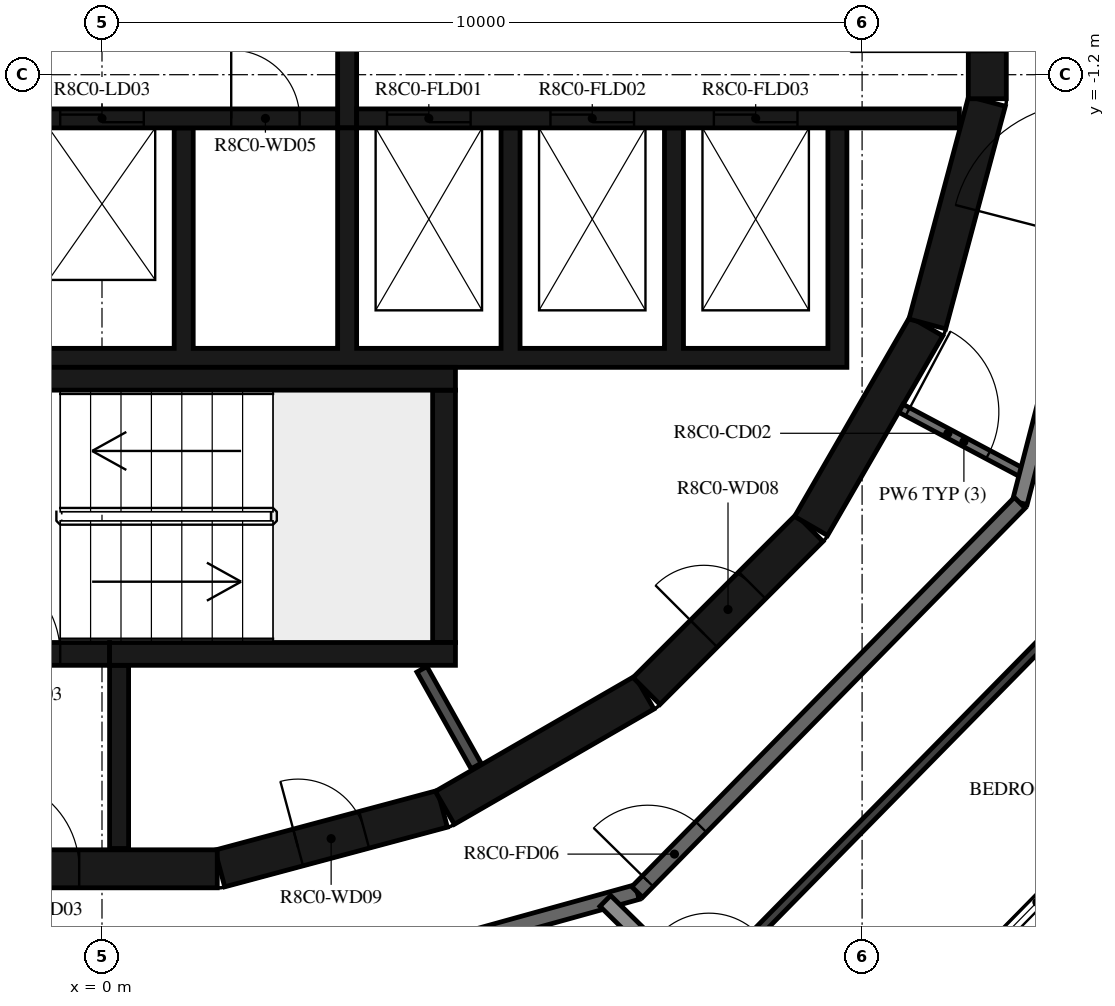
"""IFC4 building model, lengths in metres.
Left out: names, types, materials, properties, quantities, classifications, styles, units other than length and angle.
Written with IfcOpenShell. Run it as: python <this file> out.ifc"""

import sys

from ifc_helpers import new_model, si_unit, direction, frame, frame_2d, origin, place, context, subcontext, project, spatial, polyline, rectangle, outline, extrude, element, fill, save


model = new_model("IFC4")
c1 = context("Model", 3, precision=1e-05, world=origin(), true_north=direction((0.0, 1.0)))
c2 = subcontext(c1, "Body", "Model", "MODEL_VIEW")
j1 = project(units=[si_unit("LENGTHUNIT", "METRE"), si_unit("PLANEANGLEUNIT", "RADIAN")], contexts=[c1])
p1 = place(None, origin())
s1 = spatial("IfcSite", under=j1, at=p1, CompositionType="ELEMENT")
p2 = place(p1, origin())
s2 = spatial("IfcBuilding", under=s1, at=p2, CompositionType="ELEMENT")
p3 = place(p2, frame((0.0, 0.0, 319.2)))
s3 = spatial("IfcBuildingStorey", under=s2, at=p3, CompositionType="ELEMENT", Elevation=319.2)
p4 = place(p3, frame((1.55, -11.643, 0.0), z_axis=(0.0, 0.0, 1.0), x_axis=(0.965948410781, 0.258734743916, 0.0)))
e1 = element("IfcWall", 1, at=p4, inside=s3, PredefinedType="SHEAR", context=c2, shape_type="SweptSolid", body=[
    extrude(rectangle(XDim=3.033, YDim=0.5, at=frame_2d((1.516, 0.0))), origin(), (0.0, 0.0, 1.0), 3.12),
])
p5 = place(p4, frame((1.066, 0.0, 0.0)))
e2 = element("IfcOpeningElement", 2, at=p5, cuts=e1, PredefinedType="OPENING", context=c2, shape_type="SweptSolid", body=[
    extrude(rectangle(XDim=0.9, YDim=2.1, at=frame_2d((0.45, 1.05))), frame((0.0, 0.26, 0.0), z_axis=(0.0, -1.0, 0.0), x_axis=(1.0, 0.0, 0.0)), (0.0, 0.0, 1.0), 0.52),
])
p6 = place(p3, frame((4.51, -10.845, 0.0), z_axis=(0.0, 0.0, 1.0), x_axis=(0.865975092491, 0.500087131594, 0.0)))
e3 = element("IfcWall", 3, at=p6, inside=s3, PredefinedType="SHEAR", context=c2, shape_type="SweptSolid", body=[
    extrude(rectangle(XDim=3.033, YDim=0.5, at=frame_2d((1.516, 0.0))), origin(), (0.0, 0.0, 1.0), 3.12),
])
p7 = place(p3, frame((7.164, -9.308, 0.0), z_axis=(0.0, 0.0, 1.0), x_axis=(0.707106781187, 0.707106781187, 0.0)))
e4 = element("IfcWall", 4, at=p7, inside=s3, PredefinedType="SHEAR", context=c2, shape_type="SweptSolid", body=[
    extrude(rectangle(XDim=3.032, YDim=0.5, at=frame_2d((1.516, 0.0))), origin(), (0.0, 0.0, 1.0), 3.12),
])
p8 = place(p7, frame((1.066, 0.0, 0.0)))
e5 = element("IfcOpeningElement", 5, at=p8, cuts=e4, PredefinedType="OPENING", context=c2, shape_type="SweptSolid", body=[
    extrude(rectangle(XDim=0.9, YDim=2.1, at=frame_2d((0.45, 1.05))), frame((0.0, 0.26, 0.0), z_axis=(0.0, -1.0, 0.0), x_axis=(1.0, 0.0, 0.0)), (0.0, 0.0, 1.0), 0.52),
])
for number, where, z_axis, x_axis in (
    (6, (9.329, -7.137, 0.0), (0.0, 0.0, 1.0), (0.5, 0.866, 0.0)),
    (7, (10.858, -4.479, 0.0), (0.0, 0.0, 1.0), (0.259, 0.966, 0.0)),
):
    element("IfcWall", number, at=place(p3, frame(where, z_axis=z_axis, x_axis=x_axis)), inside=s3, PredefinedType="SHEAR", context=c2, shape_type="SweptSolid", body=[
        extrude(rectangle(XDim=3.033, YDim=0.5, at=frame_2d((1.516, 0.0))), origin(), (0.0, 0.0, 1.0), 3.12),
    ])
p9 = place(p3, frame((11.647, -1.516, 0.0), z_axis=(0.0, 0.0, 1.0), x_axis=(0.0, 1.0, 0.0)))
e8 = element("IfcWall", 8, at=p9, inside=s3, PredefinedType="SHEAR", context=c2, shape_type="SweptSolid", body=[
    extrude(rectangle(XDim=3.033, YDim=0.5, at=frame_2d((1.516, 0.0))), origin(), (0.0, 0.0, 1.0), 3.12),
])
p10 = place(p9, frame((0.616, 0.0, 0.0)))
e9 = element("IfcOpeningElement", 9, at=p10, cuts=e8, PredefinedType="OPENING", context=c2, shape_type="SweptSolid", body=[
    extrude(rectangle(XDim=1.8, YDim=2.1, at=frame_2d((0.9, 1.05))), frame((0.0, 0.26, 0.0), z_axis=(0.0, -1.0, 0.0), x_axis=(1.0, 0.0, 0.0)), (0.0, 0.0, 1.0), 0.52),
])
p11 = place(p3, frame((-1.516, -11.647, 0.0), z_axis=(0.0, 0.0, 1.0), x_axis=(1.0, 0.0, 0.0)))
e10 = element("IfcWall", 10, at=p11, inside=s3, PredefinedType="SHEAR", context=c2, shape_type="SweptSolid", body=[
    extrude(rectangle(XDim=3.033, YDim=0.5, at=frame_2d((1.516, 0.0))), origin(), (0.0, 0.0, 1.0), 3.12),
])
p12 = place(p11, frame((0.016, 0.0, 0.0)))
e11 = element("IfcOpeningElement", 11, at=p12, cuts=e10, PredefinedType="OPENING", context=c2, shape_type="SweptSolid", body=[
    extrude(rectangle(XDim=1.2, YDim=2.1, at=frame_2d((0.6, 1.05))), frame((0.0, 0.26, 0.0), z_axis=(0.0, -1.0, 0.0), x_axis=(1.0, 0.0, 0.0)), (0.0, 0.0, 1.0), 0.52),
])
p13 = place(p3, frame((-2.4, -5.2, 0.0), z_axis=(0.0, 0.0, 1.0), x_axis=(1.0, 0.0, 0.0)))
e12 = element("IfcWall", 12, at=p13, inside=s3, PredefinedType="SHEAR", context=c2, shape_type="SweptSolid", body=[
    extrude(rectangle(XDim=7.05, YDim=0.3, at=frame_2d((3.525, 0.0))), origin(), (0.0, 0.0, 1.0), 3.12),
])
p14 = place(p3, frame((4.5, -8.67, 0.0), z_axis=(0.0, 0.0, 1.0), x_axis=(0.0, 1.0, 0.0)))
e13 = element("IfcWall", 13, at=p14, inside=s3, PredefinedType="SHEAR", context=c2, shape_type="SweptSolid", body=[
    extrude(rectangle(XDim=3.32, YDim=0.3, at=frame_2d((1.66, 0.0))), origin(), (0.0, 0.0, 1.0), 3.12),
])
p15 = place(p3, frame((0.1, -8.82, 0.0), z_axis=(0.0, 0.0, 1.0), x_axis=(1.0, 0.0, 0.0)))
e14 = element("IfcWall", 14, at=p15, inside=s3, PredefinedType="SHEAR", context=c2, shape_type="SweptSolid", body=[
    extrude(rectangle(XDim=4.55, YDim=0.3, at=frame_2d((2.275, 0.0))), origin(), (0.0, 0.0, 1.0), 3.12),
])
p16 = place(p3, frame((-2.4, -8.82, 0.0), z_axis=(0.0, 0.0, 1.0), x_axis=(1.0, 0.0, 0.0)))
e15 = element("IfcWall", 15, at=p16, inside=s3, PredefinedType="SHEAR", context=c2, shape_type="SweptSolid", body=[
    extrude(rectangle(XDim=2.5, YDim=0.3, at=frame_2d((1.25, 0.0))), origin(), (0.0, 0.0, 1.0), 3.12),
])
p17 = place(p16, frame((0.65, 0.0, 0.0)))
e16 = element("IfcOpeningElement", 16, at=p17, cuts=e15, PredefinedType="OPENING", context=c2, shape_type="SweptSolid", body=[
    extrude(rectangle(XDim=1.2, YDim=2.1, at=frame_2d((0.6, 1.05))), frame((0.0, 0.16, 0.0), z_axis=(0.0, -1.0, 0.0), x_axis=(1.0, 0.0, 0.0)), (0.0, 0.0, 1.0), 0.32),
])
p18 = place(p3, frame((0.225, -8.97, 0.0), z_axis=(0.0, 0.0, 1.0), x_axis=(0.0, -1.0, 0.0)))
e17 = element("IfcWall", 17, at=p18, inside=s3, PredefinedType="SHEAR", context=c2, shape_type="SweptSolid", body=[
    extrude(rectangle(XDim=2.41, YDim=0.25, at=frame_2d((1.205, 0.0))), origin(), (0.0, 0.0, 1.0), 3.12),
])
p19 = place(p3, origin())
e18 = element("IfcWall", 18, at=p19, inside=s3, PredefinedType="SHEAR", context=c2, shape_type="SweptSolid", body=[
    extrude(outline(polyline([(9.8, -5.05), (9.8, -4.8), (9.8, -1.9), (9.55, -1.9), (9.55, -4.8), (7.65, -4.8), (7.65, -1.9), (7.4, -1.9), (7.4, -4.8), (5.5, -4.8), (5.5, -1.9), (5.25, -1.9), (5.25, -4.8), (3.35, -4.8), (3.35, -1.9), (3.1, -1.9), (3.1, -4.8), (1.2, -4.8), (1.2, -1.9), (0.95, -1.9), (0.95, -4.8), (-0.95, -4.8), (-0.95, -1.9), (-1.2, -1.9), (-1.2, -4.8), (-3.1, -4.8), (-3.1, -1.9), (-3.35, -1.9), (-3.35, -4.8), (-5.25, -4.8), (-5.25, -1.9), (-5.5, -1.9), (-5.5, -4.8), (-9.55, -4.8), (-9.55, -1.9), (-9.8, -1.9), (-9.8, -4.8), (-9.8, -5.05), (9.8, -5.05)])), origin(), (0.0, 0.0, 1.0), 3.12),
])
p20 = place(p3, frame((-11.28, -1.775, 0.0), z_axis=(0.0, 0.0, 1.0), x_axis=(1.0, 0.0, 0.0)))
e19 = element("IfcWall", 19, at=p20, inside=s3, PredefinedType="SHEAR", context=c2, shape_type="SweptSolid", body=[
    extrude(rectangle(XDim=14.38, YDim=0.25, at=frame_2d((7.19, 0.0))), origin(), (0.0, 0.0, 1.0), 3.12),
])
p21 = place(p20, frame((6.43, 0.0, 0.0)))
e20 = element("IfcOpeningElement", 20, at=p21, cuts=e19, PredefinedType="OPENING", context=c2, shape_type="SweptSolid", body=[
    extrude(rectangle(XDim=1.1, YDim=2.1, at=frame_2d((0.55, 1.05))), frame((0.0, 0.135, 0.0), z_axis=(0.0, -1.0, 0.0), x_axis=(1.0, 0.0, 0.0)), (0.0, 0.0, 1.0), 0.27),
])
p22 = place(p20, frame((8.58, 0.0, 0.0)))
e21 = element("IfcOpeningElement", 21, at=p22, cuts=e19, PredefinedType="OPENING", context=c2, shape_type="SweptSolid", body=[
    extrude(rectangle(XDim=1.1, YDim=2.1, at=frame_2d((0.55, 1.05))), frame((0.0, 0.135, 0.0), z_axis=(0.0, -1.0, 0.0), x_axis=(1.0, 0.0, 0.0)), (0.0, 0.0, 1.0), 0.27),
])
p23 = place(p20, frame((10.73, 0.0, 0.0)))
e22 = element("IfcOpeningElement", 22, at=p23, cuts=e19, PredefinedType="OPENING", context=c2, shape_type="SweptSolid", body=[
    extrude(rectangle(XDim=1.1, YDim=2.1, at=frame_2d((0.55, 1.05))), frame((0.0, 0.135, 0.0), z_axis=(0.0, -1.0, 0.0), x_axis=(1.0, 0.0, 0.0)), (0.0, 0.0, 1.0), 0.27),
])
p24 = place(p20, frame((3.305, 0.0, 0.0)))
e23 = element("IfcOpeningElement", 23, at=p24, cuts=e19, PredefinedType="OPENING", context=c2, shape_type="SweptSolid", body=[
    extrude(rectangle(XDim=0.9, YDim=2.1, at=frame_2d((0.45, 1.05))), frame((0.0, 0.135, 0.0), z_axis=(0.0, -1.0, 0.0), x_axis=(1.0, 0.0, 0.0)), (0.0, 0.0, 1.0), 0.27),
])
p25 = place(p20, frame((12.98, 0.0, 0.0)))
e24 = element("IfcOpeningElement", 24, at=p25, cuts=e19, PredefinedType="OPENING", context=c2, shape_type="SweptSolid", body=[
    extrude(rectangle(XDim=0.9, YDim=2.1, at=frame_2d((0.45, 1.05))), frame((0.0, 0.135, 0.0), z_axis=(0.0, -1.0, 0.0), x_axis=(1.0, 0.0, 0.0)), (0.0, 0.0, 1.0), 0.27),
])
p26 = place(p3, frame((3.35, -1.775, 0.0), z_axis=(0.0, 0.0, 1.0), x_axis=(1.0, 0.0, 0.0)))
e25 = element("IfcWall", 25, at=p26, inside=s3, PredefinedType="SHEAR", context=c2, shape_type="SweptSolid", body=[
    extrude(rectangle(XDim=7.93, YDim=0.25, at=frame_2d((3.965, 0.0))), origin(), (0.0, 0.0, 1.0), 3.12),
])
p27 = place(p26, frame((0.4, 0.0, 0.0)))
e26 = element("IfcOpeningElement", 26, at=p27, cuts=e25, PredefinedType="OPENING", context=c2, shape_type="SweptSolid", body=[
    extrude(rectangle(XDim=1.1, YDim=2.4, at=frame_2d((0.55, 1.2))), frame((0.0, 0.135, 0.0), z_axis=(0.0, -1.0, 0.0), x_axis=(1.0, 0.0, 0.0)), (0.0, 0.0, 1.0), 0.27),
])
p28 = place(p26, frame((2.55, 0.0, 0.0)))
e27 = element("IfcOpeningElement", 27, at=p28, cuts=e25, PredefinedType="OPENING", context=c2, shape_type="SweptSolid", body=[
    extrude(rectangle(XDim=1.1, YDim=2.4, at=frame_2d((0.55, 1.2))), frame((0.0, 0.135, 0.0), z_axis=(0.0, -1.0, 0.0), x_axis=(1.0, 0.0, 0.0)), (0.0, 0.0, 1.0), 0.27),
])
p29 = place(p26, frame((4.7, 0.0, 0.0)))
e28 = element("IfcOpeningElement", 28, at=p29, cuts=e25, PredefinedType="OPENING", context=c2, shape_type="SweptSolid", body=[
    extrude(rectangle(XDim=1.1, YDim=2.4, at=frame_2d((0.55, 1.2))), frame((0.0, 0.135, 0.0), z_axis=(0.0, -1.0, 0.0), x_axis=(1.0, 0.0, 0.0)), (0.0, 0.0, 1.0), 0.27),
])
p30 = place(p3, frame((3.225, -1.9, 0.0), z_axis=(0.0, 0.0, 1.0), x_axis=(0.0, 1.0, 0.0)))
e29 = element("IfcWall", 29, at=p30, inside=s3, PredefinedType="SHEAR", context=c2, shape_type="SweptSolid", body=[
    extrude(rectangle(XDim=3.8, YDim=0.25, at=frame_2d((1.9, 0.0))), origin(), (0.0, 0.0, 1.0), 3.12),
])
p31 = place(p3, frame((4.922, -10.296, 0.0), z_axis=(0.0, 0.0, 1.0), x_axis=(-0.48860846254, 0.872503163509, 0.0)))
e30 = element("IfcWall", 30, at=p31, inside=s3, PredefinedType="PARTITIONING", context=c2, shape_type="SweptSolid", body=[
    extrude(rectangle(XDim=1.459, YDim=0.15, at=frame_2d((0.73, 0.0))), origin(), (0.0, 0.0, 1.0), 3.12),
])
p32 = place(p3, frame((10.511, -5.589, 0.0), z_axis=(0.0, 0.0, 1.0), x_axis=(0.882957311919, -0.469453283437, 0.0)))
e31 = element("IfcWall", 31, at=p32, inside=s3, PredefinedType="PARTITIONING", context=c2, shape_type="SweptSolid", body=[
    extrude(rectangle(XDim=1.876, YDim=0.12, at=frame_2d((0.938, 0.0))), origin(), (0.0, 0.0, 1.0), 3.12),
])
p33 = place(p32, frame((0.1, 0.0, 0.0)))
e32 = element("IfcOpeningElement", 32, at=p33, cuts=e31, PredefinedType="OPENING", context=c2, shape_type="SweptSolid", body=[
    extrude(rectangle(XDim=1.2, YDim=2.1, at=frame_2d((0.6, 1.05))), frame((0.0, 0.07, 0.0), z_axis=(0.0, -1.0, 0.0), x_axis=(1.0, 0.0, 0.0)), (0.0, 0.0, 1.0), 0.14),
])
p34 = place(p3, frame((12.074, -6.831, 0.0), z_axis=(0.0, 0.0, 1.0), x_axis=(0.250391063186, 0.968144780225, 0.0)))
e33 = element("IfcWall", 33, at=p34, inside=s3, PredefinedType="STANDARD", context=c2, shape_type="SweptSolid", body=[
    extrude(rectangle(XDim=7.181, YDim=0.2, at=frame_2d((3.591, 0.0))), origin(), (0.0, 0.0, 1.0), 3.12),
])
p35 = place(p34, frame((3.581, 0.0, 0.0)))
e34 = element("IfcOpeningElement", 34, at=p35, cuts=e33, PredefinedType="OPENING", context=c2, shape_type="SweptSolid", body=[
    extrude(rectangle(XDim=1.8, YDim=2.1, at=frame_2d((0.9, 1.05))), frame((0.0, 0.11, 0.0), z_axis=(0.0, -1.0, 0.0), x_axis=(1.0, 0.0, 0.0)), (0.0, 0.0, 1.0), 0.22),
])
p36 = place(p3, frame((-6.831, -12.074, 0.0), z_axis=(0.0, 0.0, 1.0), x_axis=(0.968144780225, -0.250391063186, 0.0)))
e35 = element("IfcWall", 35, at=p36, inside=s3, PredefinedType="STANDARD", context=c2, shape_type="SweptSolid", body=[
    extrude(rectangle(XDim=7.181, YDim=0.2, at=frame_2d((3.591, 0.0))), origin(), (0.0, 0.0, 1.0), 3.12),
])
p37 = place(p36, frame((2.39, 0.0, 0.0)))
e36 = element("IfcOpeningElement", 36, at=p37, cuts=e35, PredefinedType="OPENING", context=c2, shape_type="SweptSolid", body=[
    extrude(rectangle(XDim=1.0, YDim=2.1, at=frame_2d((0.5, 1.05))), frame((0.0, 0.11, 0.0), z_axis=(0.0, -1.0, 0.0), x_axis=(1.0, 0.0, 0.0)), (0.0, 0.0, 1.0), 0.22),
])
p38 = place(p36, frame((5.69, 0.0, 0.0)))
e37 = element("IfcOpeningElement", 37, at=p38, cuts=e35, PredefinedType="OPENING", context=c2, shape_type="SweptSolid", body=[
    extrude(rectangle(XDim=1.0, YDim=2.1, at=frame_2d((0.5, 1.05))), frame((0.0, 0.11, 0.0), z_axis=(0.0, -1.0, 0.0), x_axis=(1.0, 0.0, 0.0)), (0.0, 0.0, 1.0), 0.22),
])
p39 = place(p3, frame((0.121, -13.872, 0.0), z_axis=(0.0, 0.0, 1.0), x_axis=(0.963625960674, 0.267254575108, 0.0)))
e38 = element("IfcWall", 38, at=p39, inside=s3, PredefinedType="STANDARD", context=c2, shape_type="SweptSolid", body=[
    extrude(rectangle(XDim=7.181, YDim=0.2, at=frame_2d((3.591, 0.0))), origin(), (0.0, 0.0, 1.0), 3.12),
])
p40 = place(p3, frame((7.041, -11.953, 0.0), z_axis=(0.0, 0.0, 1.0), x_axis=(0.70090916255, 0.713250549143, 0.0)))
e39 = element("IfcWall", 39, at=p40, inside=s3, PredefinedType="STANDARD", context=c2, shape_type="SweptSolid", body=[
    extrude(rectangle(XDim=7.181, YDim=0.2, at=frame_2d((3.59, 0.0))), origin(), (0.0, 0.0, 1.0), 3.12),
])
p41 = place(p40, frame((0.2, 0.0, 0.0)))
e40 = element("IfcOpeningElement", 40, at=p41, cuts=e39, PredefinedType="OPENING", context=c2, shape_type="SweptSolid", body=[
    extrude(rectangle(XDim=1.0, YDim=2.1, at=frame_2d((0.5, 1.05))), frame((0.0, 0.11, 0.0), z_axis=(0.0, -1.0, 0.0), x_axis=(1.0, 0.0, 0.0)), (0.0, 0.0, 1.0), 0.22),
])
p42 = place(p3, frame((9.462, -14.861, 0.0), z_axis=(0.0, 0.0, 1.0), x_axis=(-0.713302018318, 0.700856783276, 0.0)))
e41 = element("IfcWall", 41, at=p42, inside=s3, PredefinedType="STANDARD", context=c2, shape_type="SweptSolid", body=[
    extrude(rectangle(XDim=3.982, YDim=0.2, at=frame_2d((1.991, 0.0))), origin(), (0.0, 0.0, 1.0), 2.73),
])
p43 = place(p3, frame((7.846, -13.273, 0.0), z_axis=(0.0, 0.0, 1.0), x_axis=(0.700911018066, 0.713248725728, 0.0)))
e42 = element("IfcWall", 42, at=p43, inside=s3, PredefinedType="PARTITIONING", context=c2, shape_type="SweptSolid", body=[
    extrude(rectangle(XDim=7.935, YDim=0.12, at=frame_2d((3.968, 0.0))), origin(), (0.0, 0.0, 1.0), 3.12),
])
p44 = place(p43, frame((0.2, 0.0, 0.0)))
e43 = element("IfcOpeningElement", 43, at=p44, cuts=e42, PredefinedType="OPENING", context=c2, shape_type="SweptSolid", body=[
    extrude(rectangle(XDim=0.9, YDim=2.1, at=frame_2d((0.45, 1.05))), frame((0.0, 0.07, 0.0), z_axis=(0.0, -1.0, 0.0), x_axis=(1.0, 0.0, 0.0)), (0.0, 0.0, 1.0), 0.14),
])
p45 = place(p17, origin())
e44 = element("IfcDoor", 44, at=p45, inside=s3, OperationType="SINGLE_SWING_LEFT", PredefinedType="DOOR", context=c2, shape_type="SweptSolid", body=[
    extrude(rectangle(XDim=1.2, YDim=2.1, at=frame_2d((0.6, 1.05))), frame((0.0, 0.025, 0.0), z_axis=(0.0, -1.0, 0.0), x_axis=(1.0, 0.0, 0.0)), (0.0, 0.0, 1.0), 0.05),
])
fill(e16, e44)
p46 = place(p12, origin())
e45 = element("IfcDoor", 45, at=p46, inside=s3, OperationType="SINGLE_SWING_RIGHT", PredefinedType="DOOR", context=c2, shape_type="SweptSolid", body=[
    extrude(rectangle(XDim=1.2, YDim=2.1, at=frame_2d((0.6, 1.05))), frame((0.0, 0.025, 0.0), z_axis=(0.0, -1.0, 0.0), x_axis=(1.0, 0.0, 0.0)), (0.0, 0.0, 1.0), 0.05),
])
fill(e11, e45)
p47 = place(p10, origin())
e46 = element("IfcDoor", 46, at=p47, inside=s3, OperationType="DOUBLE_DOOR_SINGLE_SWING", PredefinedType="DOOR", context=c2, shape_type="SweptSolid", body=[
    extrude(rectangle(XDim=1.8, YDim=2.1, at=frame_2d((0.9, 1.05))), frame((0.0, 0.025, 0.0), z_axis=(0.0, -1.0, 0.0), x_axis=(1.0, 0.0, 0.0)), (0.0, 0.0, 1.0), 0.05),
])
fill(e9, e46)
p48 = place(p23, origin())
e47 = element("IfcDoor", 47, at=p48, inside=s3, OperationType="DOUBLE_DOOR_SLIDING", PredefinedType="DOOR", context=c2, shape_type="SweptSolid", body=[
    extrude(rectangle(XDim=1.1, YDim=2.1, at=frame_2d((0.55, 1.05))), frame((0.0, 0.025, 0.0), z_axis=(0.0, -1.0, 0.0), x_axis=(1.0, 0.0, 0.0)), (0.0, 0.0, 1.0), 0.05),
])
fill(e22, e47)
p49 = place(p27, origin())
e48 = element("IfcDoor", 48, at=p49, inside=s3, OperationType="DOUBLE_DOOR_SLIDING", PredefinedType="DOOR", context=c2, shape_type="SweptSolid", body=[
    extrude(rectangle(XDim=1.1, YDim=2.4, at=frame_2d((0.55, 1.2))), frame((0.0, 0.025, 0.0), z_axis=(0.0, -1.0, 0.0), x_axis=(1.0, 0.0, 0.0)), (0.0, 0.0, 1.0), 0.05),
])
fill(e26, e48)
p50 = place(p28, origin())
e49 = element("IfcDoor", 49, at=p50, inside=s3, OperationType="DOUBLE_DOOR_SLIDING", PredefinedType="DOOR", context=c2, shape_type="SweptSolid", body=[
    extrude(rectangle(XDim=1.1, YDim=2.4, at=frame_2d((0.55, 1.2))), frame((0.0, 0.025, 0.0), z_axis=(0.0, -1.0, 0.0), x_axis=(1.0, 0.0, 0.0)), (0.0, 0.0, 1.0), 0.05),
])
fill(e27, e49)
p51 = place(p29, origin())
e50 = element("IfcDoor", 50, at=p51, inside=s3, OperationType="DOUBLE_DOOR_SLIDING", PredefinedType="DOOR", context=c2, shape_type="SweptSolid", body=[
    extrude(rectangle(XDim=1.1, YDim=2.4, at=frame_2d((0.55, 1.2))), frame((0.0, 0.025, 0.0), z_axis=(0.0, -1.0, 0.0), x_axis=(1.0, 0.0, 0.0)), (0.0, 0.0, 1.0), 0.05),
])
fill(e28, e50)
p52 = place(p25, origin())
e51 = element("IfcDoor", 51, at=p52, inside=s3, OperationType="SINGLE_SWING_LEFT", PredefinedType="DOOR", context=c2, shape_type="SweptSolid", body=[
    extrude(rectangle(XDim=0.9, YDim=2.1, at=frame_2d((0.45, 1.05))), frame((0.0, 0.025, 0.0), z_axis=(0.0, -1.0, 0.0), x_axis=(1.0, 0.0, 0.0)), (0.0, 0.0, 1.0), 0.05),
])
fill(e24, e51)
p53 = place(p8, origin())
e52 = element("IfcDoor", 52, at=p53, inside=s3, OperationType="SINGLE_SWING_RIGHT", PredefinedType="DOOR", context=c2, shape_type="SweptSolid", body=[
    extrude(rectangle(XDim=0.9, YDim=2.1, at=frame_2d((0.45, 1.05))), frame((0.0, 0.025, 0.0), z_axis=(0.0, -1.0, 0.0), x_axis=(1.0, 0.0, 0.0)), (0.0, 0.0, 1.0), 0.05),
])
fill(e5, e52)
p54 = place(p5, origin())
e53 = element("IfcDoor", 53, at=p54, inside=s3, OperationType="SINGLE_SWING_LEFT", PredefinedType="DOOR", context=c2, shape_type="SweptSolid", body=[
    extrude(rectangle(XDim=0.9, YDim=2.1, at=frame_2d((0.45, 1.05))), frame((0.0, 0.025, 0.0), z_axis=(0.0, -1.0, 0.0), x_axis=(1.0, 0.0, 0.0)), (0.0, 0.0, 1.0), 0.05),
])
fill(e2, e53)
p55 = place(p41, origin())
e54 = element("IfcDoor", 54, at=p55, inside=s3, OperationType="SINGLE_SWING_LEFT", PredefinedType="DOOR", context=c2, shape_type="SweptSolid", body=[
    extrude(rectangle(XDim=1.0, YDim=2.1, at=frame_2d((0.5, 1.05))), frame((0.0, 0.025, 0.0), z_axis=(0.0, -1.0, 0.0), x_axis=(1.0, 0.0, 0.0)), (0.0, 0.0, 1.0), 0.05),
])
fill(e40, e54)
p56 = place(p33, origin())
e55 = element("IfcDoor", 55, at=p56, inside=s3, OperationType="DOUBLE_DOOR_SINGLE_SWING", PredefinedType="DOOR", context=c2, shape_type="SweptSolid", body=[
    extrude(rectangle(XDim=1.2, YDim=2.1, at=frame_2d((0.6, 1.05))), frame((0.0, 0.025, 0.0), z_axis=(0.0, -1.0, 0.0), x_axis=(1.0, 0.0, 0.0)), (0.0, 0.0, 1.0), 0.05),
])
fill(e32, e55)
save(model, sys.argv[1])
